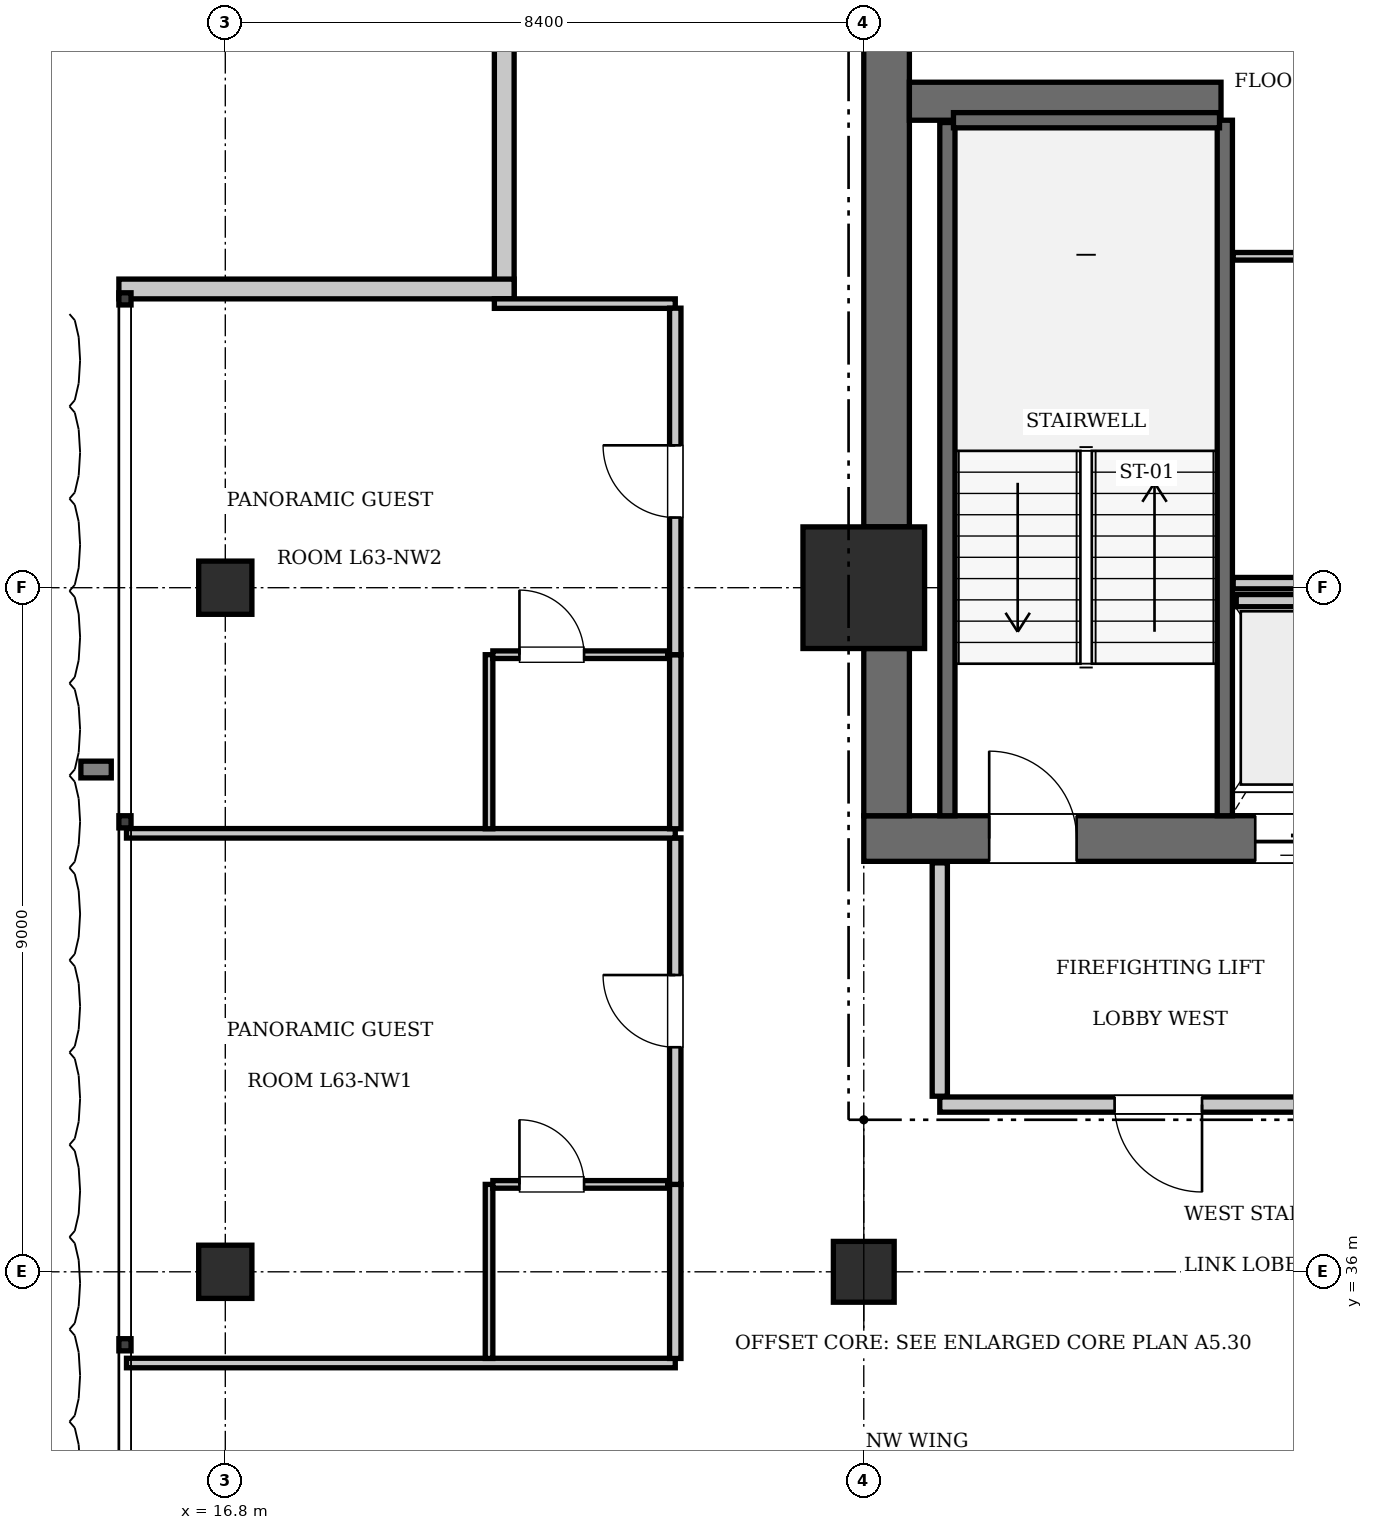
"""IFC4 building model, lengths in metres.
Left out: names, types, materials, properties, quantities, classifications, styles, units other than length and angle.
Written with IfcOpenShell. Run it as: python <this file> out.ifc"""

import sys

from ifc_helpers import new_model, si_unit, direction, frame, frame_2d, origin, origin_2d, place, context, subcontext, project, spatial, rectangle, extrude, element, fill, save


model = new_model("IFC4")
c1 = context("Model", 3, precision=1e-05, world=origin(), true_north=direction((0.0, 1.0)))
c2 = subcontext(c1, "Body", "Model", "MODEL_VIEW")
j1 = project(units=[si_unit("LENGTHUNIT", "METRE"), si_unit("PLANEANGLEUNIT", "RADIAN")], contexts=[c1])
p1 = place(None, origin())
s1 = spatial("IfcSite", under=j1, at=p1, CompositionType="ELEMENT")
p2 = place(p1, origin())
s2 = spatial("IfcBuilding", under=s1, at=p2, CompositionType="ELEMENT")
p3 = place(p2, frame((0.0, 0.0, 258.65)))
s3 = spatial("IfcBuildingStorey", under=s2, at=p3, CompositionType="ELEMENT", Elevation=258.65)
p4 = place(p3, frame((25.2, 45.0, 0.0), z_axis=(0.0, 0.0, 1.0), x_axis=(1.0, 0.0, 0.0)))
e1 = element("IfcColumn", 1, at=p4, inside=s3, PredefinedType="COLUMN", context=c2, shape_type="SweptSolid", body=[
    extrude(rectangle(XDim=1.6, YDim=1.6, at=origin_2d()), origin(), (0.0, 0.0, 1.0), 3.85),
])
p5 = place(p3, frame((25.2, 41.7, 0.0), z_axis=(0.0, 0.0, 1.0), x_axis=(1.0, 0.0, 0.0)))
e2 = element("IfcWall", 2, at=p5, inside=s3, PredefinedType="SHEAR", context=c2, shape_type="SweptSolid", body=[
    extrude(rectangle(XDim=6.8, YDim=0.6, at=frame_2d((3.4, 0.0))), origin(), (0.0, 0.0, 1.0), 3.85),
])
p6 = place(p5, frame((1.65, 0.0, 0.0)))
e3 = element("IfcOpeningElement", 3, at=p6, cuts=e2, PredefinedType="OPENING", context=c2, shape_type="SweptSolid", body=[
    extrude(rectangle(XDim=1.15, YDim=2.15, at=frame_2d((0.575, 1.075))), frame((0.0, 0.31, 0.0), z_axis=(0.0, -1.0, 0.0), x_axis=(1.0, 0.0, 0.0)), (0.0, 0.0, 1.0), 0.62),
])
p7 = place(p5, frame((5.15, 0.0, 0.0)))
e4 = element("IfcOpeningElement", 4, at=p7, cuts=e2, PredefinedType="OPENING", context=c2, shape_type="SweptSolid", body=[
    extrude(rectangle(XDim=1.1, YDim=2.2, at=frame_2d((0.55, 1.1))), frame((0.0, 0.31, 0.0), z_axis=(0.0, -1.0, 0.0), x_axis=(1.0, 0.0, 0.0)), (0.0, 0.0, 1.0), 0.62),
])
p8 = place(p3, frame((25.5, 42.0, 0.0), z_axis=(0.0, 0.0, 1.0), x_axis=(0.0, 1.0, 0.0)))
e5 = element("IfcWall", 5, at=p8, inside=s3, PredefinedType="SHEAR", context=c2, shape_type="SweptSolid", body=[
    extrude(rectangle(XDim=2.2, YDim=0.6, at=frame_2d((1.1, 0.0))), origin(), (0.0, 0.0, 1.0), 3.85),
])
p9 = place(p3, frame((25.5, 45.8, 0.0), z_axis=(0.0, 0.0, 1.0), x_axis=(0.0, 1.0, 0.0)))
e6 = element("IfcWall", 6, at=p9, inside=s3, PredefinedType="SHEAR", context=c2, shape_type="SweptSolid", body=[
    extrude(rectangle(XDim=7.6, YDim=0.6, at=frame_2d((3.8, 0.0))), origin(), (0.0, 0.0, 1.0), 3.85),
])
p10 = place(p3, frame((25.8, 51.4, 0.0), z_axis=(0.0, 0.0, 1.0), x_axis=(1.0, 0.0, 0.0)))
e7 = element("IfcWall", 7, at=p10, inside=s3, PredefinedType="SHEAR", context=c2, shape_type="SweptSolid", body=[
    extrude(rectangle(XDim=4.1, YDim=0.5, at=frame_2d((2.05, 0.0))), origin(), (0.0, 0.0, 1.0), 3.85),
])
p11 = place(p3, frame((25.2, 36.0, 0.0), z_axis=(0.0, 0.0, 1.0), x_axis=(1.0, 0.0, 0.0)))
e8 = element("IfcColumn", 8, at=p11, inside=s3, PredefinedType="COLUMN", context=c2, shape_type="SweptSolid", body=[
    extrude(rectangle(XDim=0.8, YDim=0.8, at=origin_2d()), origin(), (0.0, 0.0, 1.0), 3.85),
])
for number, where, z_axis, x_axis in (
    (9, (16.8, 36.0, 0.0), (0.0, 0.0, 1.0), (1.0, 0.0, 0.0)),
    (10, (16.8, 45.0, 0.0), (0.0, 0.0, 1.0), (1.0, 0.0, 0.0)),
):
    element("IfcColumn", number, at=place(p3, frame(where, z_axis=z_axis, x_axis=x_axis)), inside=s3, PredefinedType="COLUMN", context=c2, shape_type="SweptSolid", body=[
        extrude(rectangle(XDim=0.7, YDim=0.7, at=origin_2d()), origin(), (0.0, 0.0, 1.0), 3.85),
    ])
p12 = place(p3, frame((29.95, 42.0, 0.0), z_axis=(0.0, 0.0, 1.0), x_axis=(0.0, 1.0, 0.0)))
e11 = element("IfcWall", 11, at=p12, inside=s3, PredefinedType="SOLIDWALL", context=c2, shape_type="SweptSolid", body=[
    extrude(rectangle(XDim=9.15, YDim=0.2, at=frame_2d((4.575, 0.0))), origin(), (0.0, 0.0, 1.0), 3.61),
])
p13 = place(p3, frame((26.3, 42.0, 0.0), z_axis=(0.0, 0.0, 1.0), x_axis=(0.0, 1.0, 0.0)))
e12 = element("IfcWall", 12, at=p13, inside=s3, PredefinedType="SOLIDWALL", context=c2, shape_type="SweptSolid", body=[
    extrude(rectangle(XDim=9.12, YDim=0.2, at=frame_2d((4.56, 0.0))), origin(), (0.0, 0.0, 1.0), 3.61),
])
p14 = place(p3, frame((26.38, 51.15, 0.0), z_axis=(0.0, 0.0, 1.0), x_axis=(1.0, 0.0, 0.0)))
e13 = element("IfcWall", 13, at=p14, inside=s3, PredefinedType="SOLIDWALL", context=c2, shape_type="SweptSolid", body=[
    extrude(rectangle(XDim=3.5, YDim=0.2, at=frame_2d((1.75, 0.0))), origin(), (0.0, 0.0, 1.0), 3.61),
])
p15 = place(p3, frame((30.1, 44.83, 0.0), z_axis=(0.0, 0.0, 1.0), x_axis=(1.0, 0.0, 0.0)))
e14 = element("IfcWall", 14, at=p15, inside=s3, PredefinedType="SOLIDWALL", context=c2, shape_type="SweptSolid", body=[
    extrude(rectangle(XDim=1.6, YDim=0.16, at=frame_2d((0.8, 0.0))), origin(), (0.0, 0.0, 1.0), 3.61),
])
p16 = place(p3, frame((20.47, 48.8, 0.0), z_axis=(0.0, 0.0, 1.0), x_axis=(0.0, 1.0, 0.0)))
e15 = element("IfcWall", 15, at=p16, inside=s3, PredefinedType="SOLIDWALL", context=c2, shape_type="SweptSolid", body=[
    extrude(rectangle(XDim=5.2, YDim=0.26, at=frame_2d((2.6, 0.0))), origin(), (0.0, 0.0, 1.0), 3.61),
])
p17 = place(p3, frame((15.4, 48.93, 0.0), z_axis=(0.0, 0.0, 1.0), x_axis=(1.0, 0.0, 0.0)))
e16 = element("IfcWall", 16, at=p17, inside=s3, PredefinedType="SOLIDWALL", context=c2, shape_type="SweptSolid", body=[
    extrude(rectangle(XDim=5.2, YDim=0.26, at=frame_2d((2.6, 0.0))), origin(), (0.0, 0.0, 1.0), 3.61),
])
p18 = place(p3, frame((26.2, 38.2, 0.0), z_axis=(0.0, 0.0, 1.0), x_axis=(1.0, 0.0, 0.0)))
e17 = element("IfcWall", 17, at=p18, inside=s3, PredefinedType="PARTITIONING", context=c2, shape_type="SweptSolid", body=[
    extrude(rectangle(XDim=5.8, YDim=0.2, at=frame_2d((2.9, 0.0))), origin(), (0.0, 0.0, 1.0), 3.61),
])
p19 = place(p18, frame((2.3, 0.0, 0.0)))
e18 = element("IfcOpeningElement", 18, at=p19, cuts=e17, PredefinedType="OPENING", context=c2, shape_type="SweptSolid", body=[
    extrude(rectangle(XDim=1.15, YDim=2.15, at=frame_2d((0.575, 1.075))), frame((0.0, 0.11, 0.0), z_axis=(0.0, -1.0, 0.0), x_axis=(1.0, 0.0, 0.0)), (0.0, 0.0, 1.0), 0.22),
])
p20 = place(p3, frame((26.2, 38.31, 0.0), z_axis=(0.0, 0.0, 1.0), x_axis=(0.0, 1.0, 0.0)))
e19 = element("IfcWall", 19, at=p20, inside=s3, PredefinedType="PARTITIONING", context=c2, shape_type="SweptSolid", body=[
    extrude(rectangle(XDim=3.07, YDim=0.2, at=frame_2d((1.535, 0.0))), origin(), (0.0, 0.0, 1.0), 3.61),
])
p21 = place(p3, frame((30.06, 45.06, 0.0), z_axis=(0.0, 0.0, 1.0), x_axis=(1.0, 0.0, 0.0)))
e20 = element("IfcWall", 20, at=p21, inside=s3, PredefinedType="PARTITIONING", context=c2, shape_type="SweptSolid", body=[
    extrude(rectangle(XDim=3.18, YDim=0.15, at=frame_2d((1.59, 0.0))), origin(), (0.0, 0.0, 1.0), 3.61),
])
p22 = place(p3, frame((30.06, 49.36, 0.0), z_axis=(0.0, 0.0, 1.0), x_axis=(1.0, 0.0, 0.0)))
e21 = element("IfcWall", 21, at=p22, inside=s3, PredefinedType="PARTITIONING", context=c2, shape_type="SweptSolid", body=[
    extrude(rectangle(XDim=3.18, YDim=0.1, at=frame_2d((1.59, 0.0))), origin(), (0.0, 0.0, 1.0), 3.61),
])
p23 = place(p22, frame((1.95, 0.0, 0.0)))
e22 = element("IfcOpeningElement", 22, at=p23, cuts=e21, PredefinedType="OPENING", context=c2, shape_type="SweptSolid", body=[
    extrude(rectangle(XDim=0.8, YDim=2.05, at=frame_2d((0.4, 1.025))), frame((0.0, 0.06, 0.0), z_axis=(0.0, -1.0, 0.0), x_axis=(1.0, 0.0, 0.0)), (0.0, 0.0, 1.0), 0.12),
])
p24 = place(p3, frame((15.5, 34.8, 0.0), z_axis=(0.0, 0.0, 1.0), x_axis=(1.0, 0.0, 0.0)))
e23 = element("IfcWall", 23, at=p24, inside=s3, PredefinedType="PARTITIONING", context=c2, shape_type="SweptSolid", body=[
    extrude(rectangle(XDim=7.22, YDim=0.125, at=frame_2d((3.61, 0.0))), origin(), (0.0, 0.0, 1.0), 3.61),
])
p25 = place(p3, frame((20.34, 48.738, 0.0), z_axis=(0.0, 0.0, 1.0), x_axis=(1.0, 0.0, 0.0)))
e24 = element("IfcWall", 24, at=p25, inside=s3, PredefinedType="PARTITIONING", context=c2, shape_type="SweptSolid", body=[
    extrude(rectangle(XDim=2.38, YDim=0.125, at=frame_2d((1.19, 0.0))), origin(), (0.0, 0.0, 1.0), 3.61),
])
p26 = place(p3, frame((22.72, 34.86, 0.0), z_axis=(0.0, 0.0, 1.0), x_axis=(0.0, 1.0, 0.0)))
e25 = element("IfcWall", 25, at=p26, inside=s3, PredefinedType="PARTITIONING", context=c2, shape_type="SweptSolid", body=[
    extrude(rectangle(XDim=2.29, YDim=0.15, at=frame_2d((1.145, 0.0))), origin(), (0.0, 0.0, 1.0), 3.61),
])
p27 = place(p3, frame((22.72, 37.15, 0.0), z_axis=(0.0, 0.0, 1.0), x_axis=(0.0, 1.0, 0.0)))
e26 = element("IfcWall", 26, at=p27, inside=s3, PredefinedType="PARTITIONING", context=c2, shape_type="SweptSolid", body=[
    extrude(rectangle(XDim=4.559, YDim=0.15, at=frame_2d((2.279, 0.0))), origin(), (0.0, 0.0, 1.0), 3.61),
])
p28 = place(p27, frame((1.804, 0.0, 0.0)))
e27 = element("IfcOpeningElement", 27, at=p28, cuts=e26, PredefinedType="OPENING", context=c2, shape_type="SweptSolid", body=[
    extrude(rectangle(XDim=0.95, YDim=2.15, at=frame_2d((0.475, 1.075))), frame((0.0, 0.085, 0.0), z_axis=(0.0, -1.0, 0.0), x_axis=(1.0, 0.0, 0.0)), (0.0, 0.0, 1.0), 0.17),
])
p29 = place(p3, frame((20.27, 34.86, 0.0), z_axis=(0.0, 0.0, 1.0), x_axis=(0.0, 1.0, 0.0)))
e28 = element("IfcWall", 28, at=p29, inside=s3, PredefinedType="PARTITIONING", context=c2, shape_type="SweptSolid", body=[
    extrude(rectangle(XDim=2.29, YDim=0.1, at=frame_2d((1.145, 0.0))), origin(), (0.0, 0.0, 1.0), 3.61),
])
p30 = place(p3, frame((20.32, 37.15, 0.0), z_axis=(0.0, 0.0, 1.0), x_axis=(1.0, 0.0, 0.0)))
e29 = element("IfcWall", 29, at=p30, inside=s3, PredefinedType="PARTITIONING", context=c2, shape_type="SweptSolid", body=[
    extrude(rectangle(XDim=2.3, YDim=0.1, at=frame_2d((1.15, 0.0))), origin(), (0.0, 0.0, 1.0), 3.61),
])
p31 = place(p30, frame((0.35, 0.0, 0.0)))
e30 = element("IfcOpeningElement", 30, at=p31, cuts=e29, PredefinedType="OPENING", context=c2, shape_type="SweptSolid", body=[
    extrude(rectangle(XDim=0.85, YDim=2.1, at=frame_2d((0.425, 1.05))), frame((0.0, 0.06, 0.0), z_axis=(0.0, -1.0, 0.0), x_axis=(1.0, 0.0, 0.0)), (0.0, 0.0, 1.0), 0.12),
])
p32 = place(p3, frame((15.5, 41.769, 0.0), z_axis=(0.0, 0.0, 1.0), x_axis=(1.0, 0.0, 0.0)))
e31 = element("IfcWall", 31, at=p32, inside=s3, PredefinedType="PARTITIONING", context=c2, shape_type="SweptSolid", body=[
    extrude(rectangle(XDim=7.22, YDim=0.125, at=frame_2d((3.61, 0.0))), origin(), (0.0, 0.0, 1.0), 3.61),
])
p33 = place(p3, frame((22.72, 41.829, 0.0), z_axis=(0.0, 0.0, 1.0), x_axis=(0.0, 1.0, 0.0)))
e32 = element("IfcWall", 32, at=p33, inside=s3, PredefinedType="PARTITIONING", context=c2, shape_type="SweptSolid", body=[
    extrude(rectangle(XDim=2.29, YDim=0.15, at=frame_2d((1.145, 0.0))), origin(), (0.0, 0.0, 1.0), 3.61),
])
p34 = place(p3, frame((22.72, 44.119, 0.0), z_axis=(0.0, 0.0, 1.0), x_axis=(0.0, 1.0, 0.0)))
e33 = element("IfcWall", 33, at=p34, inside=s3, PredefinedType="PARTITIONING", context=c2, shape_type="SweptSolid", body=[
    extrude(rectangle(XDim=4.559, YDim=0.15, at=frame_2d((2.279, 0.0))), origin(), (0.0, 0.0, 1.0), 3.61),
])
p35 = place(p34, frame((1.804, 0.0, 0.0)))
e34 = element("IfcOpeningElement", 34, at=p35, cuts=e33, PredefinedType="OPENING", context=c2, shape_type="SweptSolid", body=[
    extrude(rectangle(XDim=0.95, YDim=2.15, at=frame_2d((0.475, 1.075))), frame((0.0, 0.085, 0.0), z_axis=(0.0, -1.0, 0.0), x_axis=(1.0, 0.0, 0.0)), (0.0, 0.0, 1.0), 0.17),
])
p36 = place(p3, frame((20.27, 41.829, 0.0), z_axis=(0.0, 0.0, 1.0), x_axis=(0.0, 1.0, 0.0)))
e35 = element("IfcWall", 35, at=p36, inside=s3, PredefinedType="PARTITIONING", context=c2, shape_type="SweptSolid", body=[
    extrude(rectangle(XDim=2.29, YDim=0.1, at=frame_2d((1.145, 0.0))), origin(), (0.0, 0.0, 1.0), 3.61),
])
p37 = place(p3, frame((20.32, 44.119, 0.0), z_axis=(0.0, 0.0, 1.0), x_axis=(1.0, 0.0, 0.0)))
e36 = element("IfcWall", 36, at=p37, inside=s3, PredefinedType="PARTITIONING", context=c2, shape_type="SweptSolid", body=[
    extrude(rectangle(XDim=2.3, YDim=0.1, at=frame_2d((1.15, 0.0))), origin(), (0.0, 0.0, 1.0), 3.61),
])
p38 = place(p37, frame((0.35, 0.0, 0.0)))
e37 = element("IfcOpeningElement", 37, at=p38, cuts=e36, PredefinedType="OPENING", context=c2, shape_type="SweptSolid", body=[
    extrude(rectangle(XDim=0.85, YDim=2.1, at=frame_2d((0.425, 1.05))), frame((0.0, 0.06, 0.0), z_axis=(0.0, -1.0, 0.0), x_axis=(1.0, 0.0, 0.0)), (0.0, 0.0, 1.0), 0.12),
])
p39 = place(p6, origin())
e38 = element("IfcDoor", 38, at=p39, inside=s3, OperationType="SINGLE_SWING_LEFT", PredefinedType="DOOR", context=c2, shape_type="SweptSolid", body=[
    extrude(rectangle(XDim=1.15, YDim=2.15, at=frame_2d((0.575, 1.075))), frame((0.0, 0.025, 0.0), z_axis=(0.0, -1.0, 0.0), x_axis=(1.0, 0.0, 0.0)), (0.0, 0.0, 1.0), 0.05),
])
fill(e3, e38)
p40 = place(p7, frame((1.1, 0.0, 0.0), z_axis=(0.0, 0.0, 1.0), x_axis=(-1.0, 0.0, 0.0)))
e39 = element("IfcDoor", 39, at=p40, inside=s3, OperationType="SLIDING_TO_LEFT", PredefinedType="DOOR", context=c2, shape_type="SweptSolid", body=[
    extrude(rectangle(XDim=1.1, YDim=2.2, at=frame_2d((0.55, 1.1))), frame((0.0, 0.025, 0.0), z_axis=(0.0, -1.0, 0.0), x_axis=(1.0, 0.0, 0.0)), (0.0, 0.0, 1.0), 0.05),
])
fill(e4, e39)
p41 = place(p19, frame((1.15, 0.0, 0.0), z_axis=(0.0, 0.0, 1.0), x_axis=(-1.0, 0.0, 0.0)))
e40 = element("IfcDoor", 40, at=p41, inside=s3, OperationType="SINGLE_SWING_LEFT", PredefinedType="DOOR", context=c2, shape_type="SweptSolid", body=[
    extrude(rectangle(XDim=1.15, YDim=2.15, at=frame_2d((0.575, 1.075))), frame((0.0, 0.025, 0.0), z_axis=(0.0, -1.0, 0.0), x_axis=(1.0, 0.0, 0.0)), (0.0, 0.0, 1.0), 0.05),
])
fill(e18, e40)
p42 = place(p31, origin())
e41 = element("IfcDoor", 41, at=p42, inside=s3, OperationType="SINGLE_SWING_LEFT", PredefinedType="DOOR", context=c2, shape_type="SweptSolid", body=[
    extrude(rectangle(XDim=0.85, YDim=2.1, at=frame_2d((0.425, 1.05))), frame((0.0, 0.025, 0.0), z_axis=(0.0, -1.0, 0.0), x_axis=(1.0, 0.0, 0.0)), (0.0, 0.0, 1.0), 0.05),
])
fill(e30, e41)
p43 = place(p28, origin())
e42 = element("IfcDoor", 42, at=p43, inside=s3, OperationType="SINGLE_SWING_RIGHT", PredefinedType="DOOR", context=c2, shape_type="SweptSolid", body=[
    extrude(rectangle(XDim=0.95, YDim=2.15, at=frame_2d((0.475, 1.075))), frame((0.0, 0.025, 0.0), z_axis=(0.0, -1.0, 0.0), x_axis=(1.0, 0.0, 0.0)), (0.0, 0.0, 1.0), 0.05),
])
fill(e27, e42)
p44 = place(p38, origin())
e43 = element("IfcDoor", 43, at=p44, inside=s3, OperationType="SINGLE_SWING_LEFT", PredefinedType="DOOR", context=c2, shape_type="SweptSolid", body=[
    extrude(rectangle(XDim=0.85, YDim=2.1, at=frame_2d((0.425, 1.05))), frame((0.0, 0.025, 0.0), z_axis=(0.0, -1.0, 0.0), x_axis=(1.0, 0.0, 0.0)), (0.0, 0.0, 1.0), 0.05),
])
fill(e37, e43)
p45 = place(p35, origin())
e44 = element("IfcDoor", 44, at=p45, inside=s3, OperationType="SINGLE_SWING_RIGHT", PredefinedType="DOOR", context=c2, shape_type="SweptSolid", body=[
    extrude(rectangle(XDim=0.95, YDim=2.15, at=frame_2d((0.475, 1.075))), frame((0.0, 0.025, 0.0), z_axis=(0.0, -1.0, 0.0), x_axis=(1.0, 0.0, 0.0)), (0.0, 0.0, 1.0), 0.05),
])
fill(e34, e44)
save(model, sys.argv[1])
